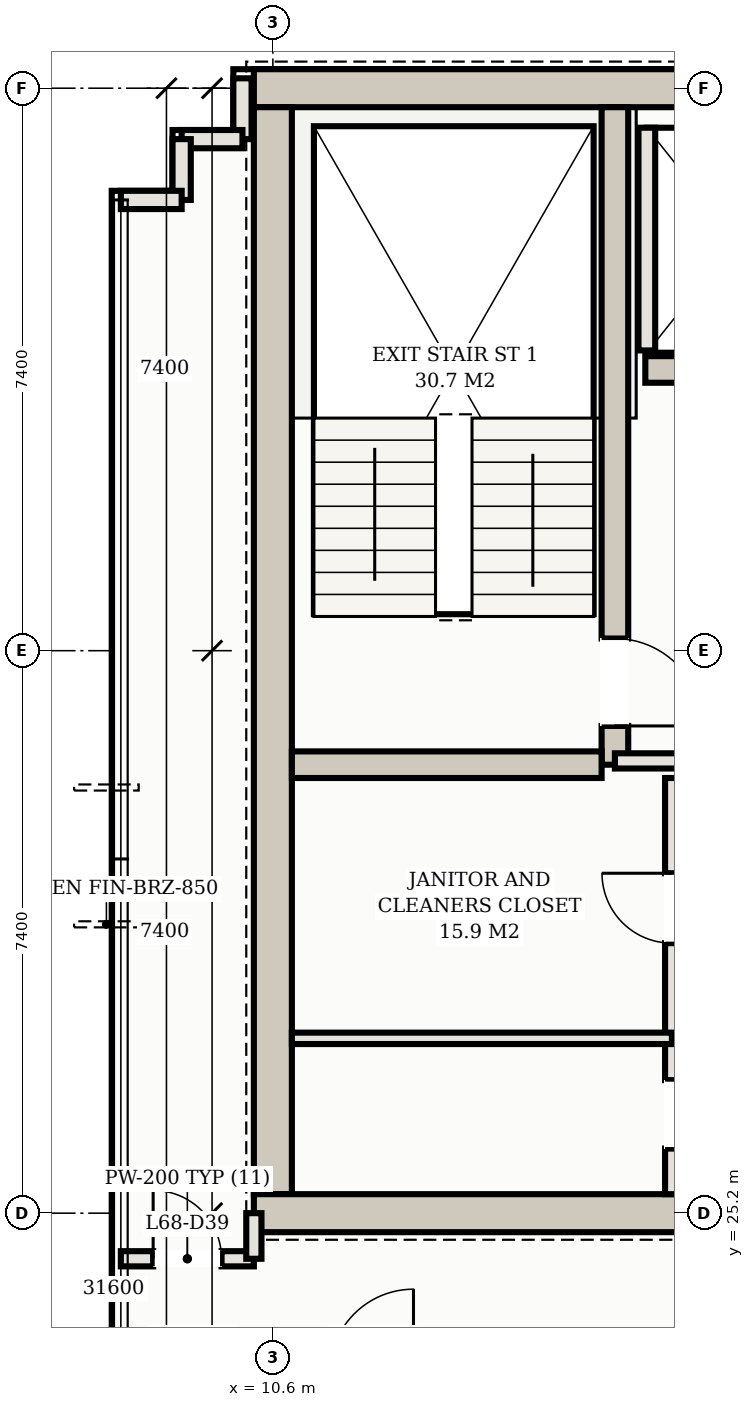
"""IFC4 building model, lengths in metres.
Left out: names, types, materials, properties, quantities, classifications, styles, units other than length and angle.
Written with IfcOpenShell. Run it as: python <this file> out.ifc"""

import sys

from ifc_helpers import new_model, si_unit, direction, frame, frame_2d, origin, place, context, subcontext, project, spatial, rectangle, extrude, element, fill, save


model = new_model("IFC4")
c1 = context("Model", 3, precision=1e-05, world=origin(), true_north=direction((0.0, 1.0)))
c2 = subcontext(c1, "Body", "Model", "MODEL_VIEW")
j1 = project(units=[si_unit("LENGTHUNIT", "METRE"), si_unit("PLANEANGLEUNIT", "RADIAN")], contexts=[c1])
p1 = place(None, origin())
s1 = spatial("IfcSite", under=j1, at=p1, CompositionType="ELEMENT")
p2 = place(p1, origin())
s2 = spatial("IfcBuilding", under=s1, at=p2, CompositionType="ELEMENT")
p3 = place(p2, frame((0.0, 0.0, 246.2)))
s3 = spatial("IfcBuildingStorey", under=s2, at=p3, CompositionType="ELEMENT", Elevation=246.2)
p4 = place(p3, frame((10.35, 40.0, 0.0), z_axis=(0.0, 0.0, 1.0), x_axis=(1.0, 0.0, 0.0)))
e1 = element("IfcWall", 1, at=p4, inside=s3, PredefinedType="SHEAR", context=c2, shape_type="SweptSolid", body=[
    extrude(rectangle(XDim=32.3, YDim=0.5, at=frame_2d((16.15, 0.0))), origin(), (0.0, 0.0, 1.0), 3.11),
])
p5 = place(p3, frame((10.6, 25.45, 0.0), z_axis=(0.0, 0.0, 1.0), x_axis=(0.0, 1.0, 0.0)))
e2 = element("IfcWall", 2, at=p5, inside=s3, PredefinedType="SHEAR", context=c2, shape_type="SweptSolid", body=[
    extrude(rectangle(XDim=14.3, YDim=0.5, at=frame_2d((7.15, 0.0))), origin(), (0.0, 0.0, 1.0), 3.11),
])
p6 = place(p3, frame((10.35, 25.2, 0.0), z_axis=(0.0, 0.0, 1.0), x_axis=(1.0, 0.0, 0.0)))
e3 = element("IfcWall", 3, at=p6, inside=s3, PredefinedType="SHEAR", context=c2, shape_type="SweptSolid", body=[
    extrude(rectangle(XDim=8.05, YDim=0.5, at=frame_2d((4.025, 0.0))), origin(), (0.0, 0.0, 1.0), 3.11),
])
p7 = place(p6, frame((6.15, 0.0, 0.0)))
e4 = element("IfcOpeningElement", 4, at=p7, cuts=e3, PredefinedType="OPENING", context=c2, shape_type="SweptSolid", body=[
    extrude(rectangle(XDim=1.25, YDim=2.2, at=frame_2d((0.625, 1.1))), frame((0.0, 0.26, 0.0), z_axis=(0.0, -1.0, 0.0), x_axis=(1.0, 0.0, 0.0)), (0.0, 0.0, 1.0), 0.52),
])
p8 = place(p3, frame((15.1, 31.1, 0.0), z_axis=(0.0, 0.0, 1.0), x_axis=(0.0, 1.0, 0.0)))
e5 = element("IfcWall", 5, at=p8, inside=s3, PredefinedType="SHEAR", context=c2, shape_type="SweptSolid", body=[
    extrude(rectangle(XDim=8.65, YDim=0.35, at=frame_2d((4.325, 0.0))), origin(), (0.0, 0.0, 1.0), 3.11),
])
p9 = place(p8, frame((0.51, 0.0, 0.0)))
e6 = element("IfcOpeningElement", 6, at=p9, cuts=e5, PredefinedType="OPENING", context=c2, shape_type="SweptSolid", body=[
    extrude(rectangle(XDim=1.15, YDim=2.2, at=frame_2d((0.575, 1.1))), frame((0.0, 0.185, 0.0), z_axis=(0.0, -1.0, 0.0), x_axis=(1.0, 0.0, 0.0)), (0.0, 0.0, 1.0), 0.37),
])
p10 = place(p3, frame((10.85, 31.1, 0.0), z_axis=(0.0, 0.0, 1.0), x_axis=(1.0, 0.0, 0.0)))
e7 = element("IfcWall", 7, at=p10, inside=s3, PredefinedType="SHEAR", context=c2, shape_type="SweptSolid", body=[
    extrude(rectangle(XDim=4.075, YDim=0.35, at=frame_2d((2.038, 0.0))), origin(), (0.0, 0.0, 1.0), 3.11),
])
p11 = place(p3, frame((15.5, 36.3, 0.0), z_axis=(0.0, 0.0, 1.0), x_axis=(1.0, 0.0, 0.0)))
e8 = element("IfcWall", 8, at=p11, inside=s3, PredefinedType="SHEAR", context=c2, shape_type="SweptSolid", body=[
    extrude(rectangle(XDim=22.0, YDim=0.35, at=frame_2d((11.0, 0.0))), origin(), (0.0, 0.0, 1.0), 3.11),
])
p12 = place(p11, frame((0.65, 0.0, 0.0)))
e9 = element("IfcOpeningElement", 9, at=p12, cuts=e8, PredefinedType="OPENING", context=c2, shape_type="SweptSolid", body=[
    extrude(rectangle(XDim=1.1, YDim=2.15, at=frame_2d((0.55, 1.075))), frame((0.0, 0.185, 0.0), z_axis=(0.0, -1.0, 0.0), x_axis=(1.0, 0.0, 0.0)), (0.0, 0.0, 1.0), 0.37),
])
p13 = place(p11, frame((20.25, 0.0, 0.0)))
e10 = element("IfcOpeningElement", 10, at=p13, cuts=e8, PredefinedType="OPENING", context=c2, shape_type="SweptSolid", body=[
    extrude(rectangle(XDim=1.1, YDim=2.15, at=frame_2d((0.55, 1.075))), frame((0.0, 0.185, 0.0), z_axis=(0.0, -1.0, 0.0), x_axis=(1.0, 0.0, 0.0)), (0.0, 0.0, 1.0), 0.37),
])
p14 = place(p11, frame((17.05, 0.0, 0.0)))
e11 = element("IfcOpeningElement", 11, at=p14, cuts=e8, PredefinedType="OPENING", context=c2, shape_type="SweptSolid", body=[
    extrude(rectangle(XDim=1.3, YDim=2.2, at=frame_2d((0.65, 1.1))), frame((0.0, 0.185, 0.0), z_axis=(0.0, -1.0, 0.0), x_axis=(1.0, 0.0, 0.0)), (0.0, 0.0, 1.0), 0.37),
])
p15 = place(p11, frame((3.95, 0.0, 0.0)))
e12 = element("IfcOpeningElement", 12, at=p15, cuts=e8, PredefinedType="OPENING", context=c2, shape_type="SweptSolid", body=[
    extrude(rectangle(XDim=1.1, YDim=2.15, at=frame_2d((0.55, 1.075))), frame((0.0, 0.185, 0.0), z_axis=(0.0, -1.0, 0.0), x_axis=(1.0, 0.0, 0.0)), (0.0, 0.0, 1.0), 0.37),
])
p16 = place(p11, frame((6.55, 0.0, 0.0)))
e13 = element("IfcOpeningElement", 13, at=p16, cuts=e8, PredefinedType="OPENING", context=c2, shape_type="SweptSolid", body=[
    extrude(rectangle(XDim=1.1, YDim=2.15, at=frame_2d((0.55, 1.075))), frame((0.0, 0.185, 0.0), z_axis=(0.0, -1.0, 0.0), x_axis=(1.0, 0.0, 0.0)), (0.0, 0.0, 1.0), 0.37),
])
p17 = place(p11, frame((9.15, 0.0, 0.0)))
e14 = element("IfcOpeningElement", 14, at=p17, cuts=e8, PredefinedType="OPENING", context=c2, shape_type="SweptSolid", body=[
    extrude(rectangle(XDim=1.1, YDim=2.15, at=frame_2d((0.55, 1.075))), frame((0.0, 0.185, 0.0), z_axis=(0.0, -1.0, 0.0), x_axis=(1.0, 0.0, 0.0)), (0.0, 0.0, 1.0), 0.37),
])
p18 = place(p3, frame((15.52, 36.55, 0.0), z_axis=(0.0, 0.0, 1.0), x_axis=(0.0, 1.0, 0.0)))
e15 = element("IfcWall", 15, at=p18, inside=s3, PredefinedType="SOLIDWALL", context=c2, shape_type="SweptSolid", body=[
    extrude(rectangle(XDim=2.93, YDim=0.22, at=frame_2d((1.465, 0.0))), origin(), (0.0, 0.0, 1.0), 3.11),
])
p19 = place(p3, frame((10.2, 40.13, 0.0), z_axis=(0.0, 0.0, 1.0), x_axis=(0.0, -1.0, 0.0)))
e16 = element("IfcWall", 16, at=p19, inside=s3, PredefinedType="SOLIDWALL", context=c2, shape_type="SweptSolid", body=[
    extrude(rectangle(XDim=0.8, YDim=0.24, at=frame_2d((0.4, 0.0))), origin(), (0.0, 0.0, 1.0), 3.11),
])
for number, where, z_axis, x_axis in (
    (17, (10.2, 39.33, 0.0), (0.0, 0.0, 1.0), (-1.0, 0.0, 0.0)),
    (18, (9.4, 39.33, 0.0), (0.0, 0.0, 1.0), (0.0, -1.0, 0.0)),
):
    element("IfcWall", number, at=place(p3, frame(where, z_axis=z_axis, x_axis=x_axis)), inside=s3, PredefinedType="SOLIDWALL", context=c2, shape_type="SweptSolid", body=[
        extrude(rectangle(XDim=0.8, YDim=0.24, at=frame_2d((0.4, 0.0))), origin(), (0.0, 0.0, 1.0), 3.11),
    ])
p20 = place(p3, frame((9.4, 38.53, 0.0), z_axis=(0.0, 0.0, 1.0), x_axis=(-1.0, 0.0, 0.0)))
e19 = element("IfcWall", 19, at=p20, inside=s3, PredefinedType="SOLIDWALL", context=c2, shape_type="SweptSolid", body=[
    extrude(rectangle(XDim=0.8, YDim=0.24, at=frame_2d((0.4, 0.0))), origin(), (0.0, 0.0, 1.0), 3.11),
])
p21 = place(p3, frame((15.1, 31.15, 0.0), z_axis=(0.0, 0.0, 1.0), x_axis=(1.0, 0.0, 0.0)))
e20 = element("IfcWall", 20, at=p21, inside=s3, PredefinedType="PARTITIONING", context=c2, shape_type="SweptSolid", body=[
    extrude(rectangle(XDim=3.25, YDim=0.2, at=frame_2d((1.625, 0.0))), origin(), (0.0, 0.0, 1.0), 2.45),
])
p22 = place(p21, frame((1.275, 0.0, 0.0)))
e21 = element("IfcOpeningElement", 21, at=p22, cuts=e20, PredefinedType="OPENING", context=c2, shape_type="SweptSolid", body=[
    extrude(rectangle(XDim=1.25, YDim=2.2, at=frame_2d((0.625, 1.1))), frame((0.0, 0.11, 0.0), z_axis=(0.0, -1.0, 0.0), x_axis=(1.0, 0.0, 0.0)), (0.0, 0.0, 1.0), 0.22),
])
p23 = place(p3, frame((15.85, 25.45, 0.0), z_axis=(0.0, 0.0, 1.0), x_axis=(0.0, 1.0, 0.0)))
e22 = element("IfcWall", 22, at=p23, inside=s3, PredefinedType="PARTITIONING", context=c2, shape_type="SweptSolid", body=[
    extrude(rectangle(XDim=5.475, YDim=0.18, at=frame_2d((2.738, 0.0))), origin(), (0.0, 0.0, 1.0), 2.45),
])
p24 = place(p23, frame((0.6, 0.0, 0.0)))
e23 = element("IfcOpeningElement", 23, at=p24, cuts=e22, PredefinedType="OPENING", context=c2, shape_type="SweptSolid", body=[
    extrude(rectangle(XDim=0.9, YDim=2.15, at=frame_2d((0.45, 1.075))), frame((0.0, 0.1, 0.0), z_axis=(0.0, -1.0, 0.0), x_axis=(1.0, 0.0, 0.0)), (0.0, 0.0, 1.0), 0.2),
])
p25 = place(p23, frame((3.302, 0.0, 0.0)))
e24 = element("IfcOpeningElement", 24, at=p25, cuts=e22, PredefinedType="OPENING", context=c2, shape_type="SweptSolid", body=[
    extrude(rectangle(XDim=0.92, YDim=2.15, at=frame_2d((0.46, 1.075))), frame((0.0, 0.1, 0.0), z_axis=(0.0, -1.0, 0.0), x_axis=(1.0, 0.0, 0.0)), (0.0, 0.0, 1.0), 0.2),
])
p26 = place(p3, frame((10.85, 27.5, 0.0), z_axis=(0.0, 0.0, 1.0), x_axis=(1.0, 0.0, 0.0)))
e25 = element("IfcWall", 25, at=p26, inside=s3, PredefinedType="PARTITIONING", context=c2, shape_type="SweptSolid", body=[
    extrude(rectangle(XDim=5.0, YDim=0.15, at=frame_2d((2.5, 0.0))), origin(), (0.0, 0.0, 1.0), 2.45),
])
p27 = place(p3, frame((8.6, 24.6, 0.0), z_axis=(0.0, 0.0, 1.0), x_axis=(1.0, 0.0, 0.0)))
e26 = element("IfcWall", 26, at=p27, inside=s3, PredefinedType="PARTITIONING", context=c2, shape_type="SweptSolid", body=[
    extrude(rectangle(XDim=1.75, YDim=0.2, at=frame_2d((0.875, 0.0))), origin(), (0.0, 0.0, 1.0), 2.45),
])
p28 = place(p27, frame((0.425, 0.0, 0.0)))
e27 = element("IfcOpeningElement", 27, at=p28, cuts=e26, PredefinedType="OPENING", context=c2, shape_type="SweptSolid", body=[
    extrude(rectangle(XDim=0.9, YDim=2.15, at=frame_2d((0.45, 1.075))), frame((0.0, 0.11, 0.0), z_axis=(0.0, -1.0, 0.0), x_axis=(1.0, 0.0, 0.0)), (0.0, 0.0, 1.0), 0.22),
])
p29 = place(p3, frame((10.35, 24.6, 0.0), z_axis=(0.0, 0.0, 1.0), x_axis=(0.0, 1.0, 0.0)))
e28 = element("IfcWall", 28, at=p29, inside=s3, PredefinedType="PARTITIONING", context=c2, shape_type="SweptSolid", body=[
    extrude(rectangle(XDim=0.6, YDim=0.2, at=frame_2d((0.3, 0.0))), origin(), (0.0, 0.0, 1.0), 2.45),
])
p30 = place(p9, frame((1.15, 0.0, 0.0), z_axis=(0.0, 0.0, 1.0), x_axis=(-1.0, 0.0, 0.0)))
e29 = element("IfcDoor", 29, at=p30, inside=s3, OperationType="SINGLE_SWING_RIGHT", PredefinedType="DOOR", context=c2, shape_type="SweptSolid", body=[
    extrude(rectangle(XDim=1.15, YDim=2.2, at=frame_2d((0.575, 1.1))), frame((0.0, 0.025, 0.0), z_axis=(0.0, -1.0, 0.0), x_axis=(1.0, 0.0, 0.0)), (0.0, 0.0, 1.0), 0.05),
])
fill(e6, e29)
p31 = place(p24, frame((0.9, 0.0, 0.0), z_axis=(0.0, 0.0, 1.0), x_axis=(-1.0, 0.0, 0.0)))
e30 = element("IfcDoor", 30, at=p31, inside=s3, OperationType="SINGLE_SWING_RIGHT", PredefinedType="DOOR", context=c2, shape_type="SweptSolid", body=[
    extrude(rectangle(XDim=0.9, YDim=2.15, at=frame_2d((0.45, 1.075))), frame((0.0, 0.025, 0.0), z_axis=(0.0, -1.0, 0.0), x_axis=(1.0, 0.0, 0.0)), (0.0, 0.0, 1.0), 0.05),
])
fill(e23, e30)
p32 = place(p25, origin())
e31 = element("IfcDoor", 31, at=p32, inside=s3, OperationType="SINGLE_SWING_RIGHT", PredefinedType="DOOR", context=c2, shape_type="SweptSolid", body=[
    extrude(rectangle(XDim=0.92, YDim=2.15, at=frame_2d((0.46, 1.075))), frame((0.0, 0.025, 0.0), z_axis=(0.0, -1.0, 0.0), x_axis=(1.0, 0.0, 0.0)), (0.0, 0.0, 1.0), 0.05),
])
fill(e24, e31)
p33 = place(p28, origin())
e32 = element("IfcDoor", 32, at=p33, inside=s3, OperationType="SINGLE_SWING_LEFT", PredefinedType="DOOR", context=c2, shape_type="SweptSolid", body=[
    extrude(rectangle(XDim=0.9, YDim=2.15, at=frame_2d((0.45, 1.075))), frame((0.0, 0.025, 0.0), z_axis=(0.0, -1.0, 0.0), x_axis=(1.0, 0.0, 0.0)), (0.0, 0.0, 1.0), 0.05),
])
fill(e27, e32)
save(model, sys.argv[1])
